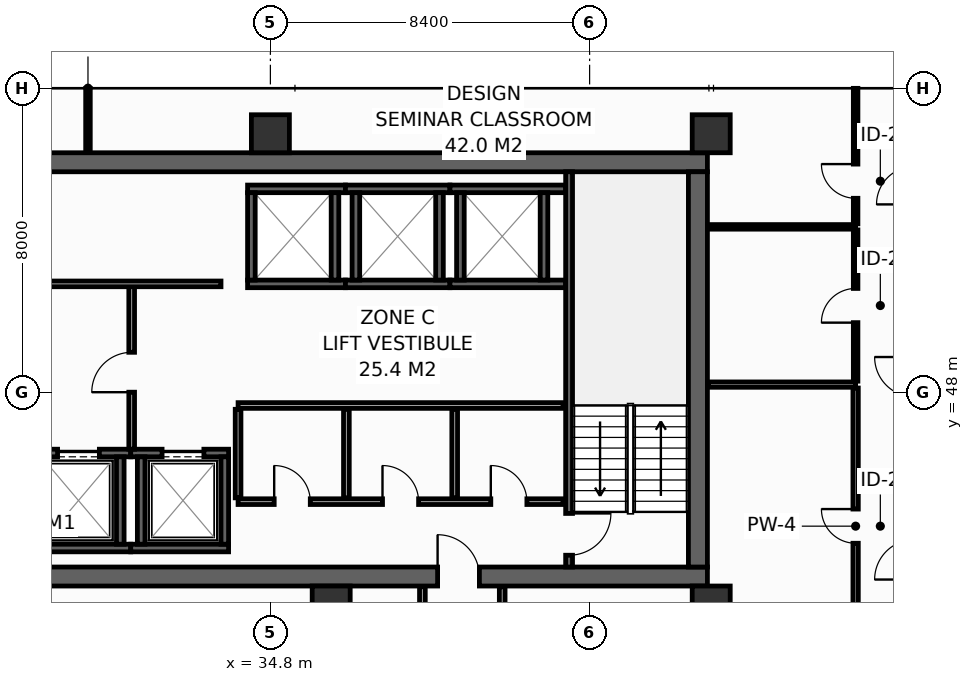
"""IFC4 building model, lengths in metres.
Left out: names, types, materials, properties, quantities, classifications, styles, units other than length and angle.
Written with IfcOpenShell. Run it as: python <this file> out.ifc"""

import sys

from ifc_helpers import new_model, si_unit, direction, frame, frame_2d, origin, origin_2d, place, context, subcontext, project, spatial, rectangle, hollow_rectangle, extrude, element, fill, save


model = new_model("IFC4")
c1 = context("Model", 3, precision=1e-05, world=origin(), true_north=direction((0.0, 1.0)))
c2 = subcontext(c1, "Body", "Model", "MODEL_VIEW")
j1 = project(units=[si_unit("LENGTHUNIT", "METRE"), si_unit("PLANEANGLEUNIT", "RADIAN")], contexts=[c1])
p1 = place(None, origin())
s1 = spatial("IfcSite", under=j1, at=p1, CompositionType="ELEMENT")
p2 = place(p1, origin())
s2 = spatial("IfcBuilding", under=s1, at=p2, CompositionType="ELEMENT")
p3 = place(p2, frame((0.0, 0.0, 171.4)))
s3 = spatial("IfcBuildingStorey", under=s2, at=p3, CompositionType="ELEMENT", Elevation=171.4)
p4 = place(p3, frame((13.6, 43.15, 0.0), z_axis=(0.0, 0.0, 1.0), x_axis=(1.0, 0.0, 0.0)))
e1 = element("IfcWall", 1, at=p4, inside=s3, PredefinedType="SHEAR", context=c2, shape_type="SweptSolid", body=[
    extrude(rectangle(XDim=32.7, YDim=0.5, at=frame_2d((16.35, 0.0))), origin(), (0.0, 0.0, 1.0), 3.55),
])
p5 = place(p4, frame((5.4, 0.0, 0.0)))
e2 = element("IfcOpeningElement", 2, at=p5, cuts=e1, PredefinedType="OPENING", context=c2, shape_type="SweptSolid", body=[
    extrude(rectangle(XDim=1.1, YDim=2.15, at=frame_2d((0.55, 1.075))), frame((0.0, 0.26, 0.0), z_axis=(0.0, -1.0, 0.0), x_axis=(1.0, 0.0, 0.0)), (0.0, 0.0, 1.0), 0.52),
])
p6 = place(p4, frame((25.6, 0.0, 0.0)))
e3 = element("IfcOpeningElement", 3, at=p6, cuts=e1, PredefinedType="OPENING", context=c2, shape_type="SweptSolid", body=[
    extrude(rectangle(XDim=1.1, YDim=2.15, at=frame_2d((0.55, 1.075))), frame((0.0, 0.26, 0.0), z_axis=(0.0, -1.0, 0.0), x_axis=(1.0, 0.0, 0.0)), (0.0, 0.0, 1.0), 0.52),
])
p7 = place(p3, frame((13.6, 54.05, 0.0), z_axis=(0.0, 0.0, 1.0), x_axis=(1.0, 0.0, 0.0)))
e4 = element("IfcWall", 4, at=p7, inside=s3, PredefinedType="SHEAR", context=c2, shape_type="SweptSolid", body=[
    extrude(rectangle(XDim=32.7, YDim=0.5, at=frame_2d((16.35, 0.0))), origin(), (0.0, 0.0, 1.0), 3.55),
])
p8 = place(p3, frame((46.05, 43.4, 0.0), z_axis=(0.0, 0.0, 1.0), x_axis=(0.0, 1.0, 0.0)))
e5 = element("IfcWall", 5, at=p8, inside=s3, PredefinedType="SHEAR", context=c2, shape_type="SweptSolid", body=[
    extrude(rectangle(XDim=10.4, YDim=0.5, at=frame_2d((5.2, 0.0))), origin(), (0.0, 0.0, 1.0), 3.55),
])
for number, where, z_axis, x_axis in (
    (6, (34.8, 54.8, 0.0), (0.0, 0.0, 1.0), (1.0, 0.0, 0.0)),
    (7, (46.4, 54.8, 0.0), (0.0, 0.0, 1.0), (1.0, 0.0, 0.0)),
    (8, (36.4, 42.4, 0.0), (0.0, 0.0, 1.0), (1.0, 0.0, 0.0)),
    (9, (46.4, 42.4, 0.0), (0.0, 0.0, 1.0), (1.0, 0.0, 0.0)),
):
    element("IfcColumn", number, at=place(p3, frame(where, z_axis=z_axis, x_axis=x_axis)), inside=s3, PredefinedType="COLUMN", context=c2, shape_type="SweptSolid", body=[
        extrude(hollow_rectangle(XDim=1.0, YDim=1.0, WallThickness=0.045, at=origin_2d()), origin(), (0.0, 0.0, 1.0), 3.8),
    ])
p9 = place(p3, frame((28.375, 43.9, 0.0), z_axis=(0.0, 0.0, 1.0), x_axis=(1.0, 0.0, 0.0)))
e10 = element("IfcWall", 10, at=p9, inside=s3, PredefinedType="SHEAR", context=c2, shape_type="SweptSolid", body=[
    extrude(rectangle(XDim=2.75, YDim=0.2, at=frame_2d((1.375, 0.0))), origin(), (0.0, 0.0, 1.0), 3.55),
])
p10 = place(p3, frame((28.375, 46.4, 0.0), z_axis=(0.0, 0.0, 1.0), x_axis=(1.0, 0.0, 0.0)))
e11 = element("IfcWall", 11, at=p10, inside=s3, PredefinedType="SHEAR", context=c2, shape_type="SweptSolid", body=[
    extrude(rectangle(XDim=2.75, YDim=0.2, at=frame_2d((1.375, 0.0))), origin(), (0.0, 0.0, 1.0), 3.55),
])
p11 = place(p10, frame((0.825, 0.0, 0.0)))
e12 = element("IfcOpeningElement", 12, at=p11, cuts=e11, PredefinedType="OPENING", context=c2, shape_type="SweptSolid", body=[
    extrude(rectangle(XDim=1.1, YDim=2.2, at=frame_2d((0.55, 1.1))), frame((0.0, 0.11, 0.0), z_axis=(0.0, -1.0, 0.0), x_axis=(1.0, 0.0, 0.0)), (0.0, 0.0, 1.0), 0.22),
])
p12 = place(p3, frame((30.85, 44.0, 0.0), z_axis=(0.0, 0.0, 1.0), x_axis=(0.0, 1.0, 0.0)))
e13 = element("IfcWall", 13, at=p12, inside=s3, PredefinedType="SHEAR", context=c2, shape_type="SweptSolid", body=[
    extrude(rectangle(XDim=2.3, YDim=0.2, at=frame_2d((1.15, 0.0))), origin(), (0.0, 0.0, 1.0), 3.55),
])
p13 = place(p3, frame((31.125, 43.9, 0.0), z_axis=(0.0, 0.0, 1.0), x_axis=(1.0, 0.0, 0.0)))
e14 = element("IfcWall", 14, at=p13, inside=s3, PredefinedType="SHEAR", context=c2, shape_type="SweptSolid", body=[
    extrude(rectangle(XDim=2.575, YDim=0.2, at=frame_2d((1.288, 0.0))), origin(), (0.0, 0.0, 1.0), 3.55),
])
p14 = place(p3, frame((31.125, 46.4, 0.0), z_axis=(0.0, 0.0, 1.0), x_axis=(1.0, 0.0, 0.0)))
e15 = element("IfcWall", 15, at=p14, inside=s3, PredefinedType="SHEAR", context=c2, shape_type="SweptSolid", body=[
    extrude(rectangle(XDim=2.575, YDim=0.2, at=frame_2d((1.288, 0.0))), origin(), (0.0, 0.0, 1.0), 3.55),
])
p15 = place(p14, frame((0.825, 0.0, 0.0)))
e16 = element("IfcOpeningElement", 16, at=p15, cuts=e15, PredefinedType="OPENING", context=c2, shape_type="SweptSolid", body=[
    extrude(rectangle(XDim=1.1, YDim=2.2, at=frame_2d((0.55, 1.1))), frame((0.0, 0.11, 0.0), z_axis=(0.0, -1.0, 0.0), x_axis=(1.0, 0.0, 0.0)), (0.0, 0.0, 1.0), 0.22),
])
for number, where, z_axis, x_axis in (
    (17, (31.4, 44.0, 0.0), (0.0, 0.0, 1.0), (0.0, 1.0, 0.0)),
    (18, (33.6, 44.0, 0.0), (0.0, 0.0, 1.0), (0.0, 1.0, 0.0)),
):
    element("IfcWall", number, at=place(p3, frame(where, z_axis=z_axis, x_axis=x_axis)), inside=s3, PredefinedType="SHEAR", context=c2, shape_type="SweptSolid", body=[
        extrude(rectangle(XDim=2.3, YDim=0.2, at=frame_2d((1.15, 0.0))), origin(), (0.0, 0.0, 1.0), 3.55),
    ])
for number, where, z_axis, x_axis in (
    (19, (34.2, 50.85, 0.0), (0.0, 0.0, 1.0), (1.0, 0.0, 0.0)),
    (20, (34.2, 53.35, 0.0), (0.0, 0.0, 1.0), (1.0, 0.0, 0.0)),
):
    element("IfcWall", number, at=place(p3, frame(where, z_axis=z_axis, x_axis=x_axis)), inside=s3, PredefinedType="SHEAR", context=c2, shape_type="SweptSolid", body=[
        extrude(rectangle(XDim=2.575, YDim=0.2, at=frame_2d((1.288, 0.0))), origin(), (0.0, 0.0, 1.0), 3.55),
    ])
for number, where, z_axis, x_axis in (
    (21, (34.3, 50.95, 0.0), (0.0, 0.0, 1.0), (0.0, 1.0, 0.0)),
    (22, (36.5, 50.95, 0.0), (0.0, 0.0, 1.0), (0.0, 1.0, 0.0)),
):
    element("IfcWall", number, at=place(p3, frame(where, z_axis=z_axis, x_axis=x_axis)), inside=s3, PredefinedType="SHEAR", context=c2, shape_type="SweptSolid", body=[
        extrude(rectangle(XDim=2.3, YDim=0.2, at=frame_2d((1.15, 0.0))), origin(), (0.0, 0.0, 1.0), 3.55),
    ])
for number, where, z_axis, x_axis in (
    (23, (36.775, 50.85, 0.0), (0.0, 0.0, 1.0), (1.0, 0.0, 0.0)),
    (24, (36.775, 53.35, 0.0), (0.0, 0.0, 1.0), (1.0, 0.0, 0.0)),
):
    element("IfcWall", number, at=place(p3, frame(where, z_axis=z_axis, x_axis=x_axis)), inside=s3, PredefinedType="SHEAR", context=c2, shape_type="SweptSolid", body=[
        extrude(rectangle(XDim=2.75, YDim=0.2, at=frame_2d((1.375, 0.0))), origin(), (0.0, 0.0, 1.0), 3.55),
    ])
for number, where, z_axis, x_axis in (
    (25, (37.05, 50.95, 0.0), (0.0, 0.0, 1.0), (0.0, 1.0, 0.0)),
    (26, (39.25, 50.95, 0.0), (0.0, 0.0, 1.0), (0.0, 1.0, 0.0)),
):
    element("IfcWall", number, at=place(p3, frame(where, z_axis=z_axis, x_axis=x_axis)), inside=s3, PredefinedType="SHEAR", context=c2, shape_type="SweptSolid", body=[
        extrude(rectangle(XDim=2.3, YDim=0.2, at=frame_2d((1.15, 0.0))), origin(), (0.0, 0.0, 1.0), 3.55),
    ])
for number, where, z_axis, x_axis in (
    (27, (39.525, 50.85, 0.0), (0.0, 0.0, 1.0), (1.0, 0.0, 0.0)),
    (28, (39.525, 53.35, 0.0), (0.0, 0.0, 1.0), (1.0, 0.0, 0.0)),
):
    element("IfcWall", number, at=place(p3, frame(where, z_axis=z_axis, x_axis=x_axis)), inside=s3, PredefinedType="SHEAR", context=c2, shape_type="SweptSolid", body=[
        extrude(rectangle(XDim=3.045, YDim=0.2, at=frame_2d((1.522, 0.0))), origin(), (0.0, 0.0, 1.0), 3.55),
    ])
for number, where, z_axis, x_axis in (
    (29, (39.8, 50.95, 0.0), (0.0, 0.0, 1.0), (0.0, 1.0, 0.0)),
    (30, (42.0, 50.95, 0.0), (0.0, 0.0, 1.0), (0.0, 1.0, 0.0)),
):
    element("IfcWall", number, at=place(p3, frame(where, z_axis=z_axis, x_axis=x_axis)), inside=s3, PredefinedType="SHEAR", context=c2, shape_type="SweptSolid", body=[
        extrude(rectangle(XDim=2.3, YDim=0.2, at=frame_2d((1.15, 0.0))), origin(), (0.0, 0.0, 1.0), 3.55),
    ])
p16 = place(p3, frame((42.66, 53.8, 0.0), z_axis=(0.0, 0.0, 1.0), x_axis=(0.0, -1.0, 0.0)))
e31 = element("IfcWall", 31, at=p16, inside=s3, PredefinedType="SHEAR", context=c2, shape_type="SweptSolid", body=[
    extrude(rectangle(XDim=10.4, YDim=0.18, at=frame_2d((5.2, 0.0))), origin(), (0.0, 0.0, 1.0), 3.55),
])
p17 = place(p16, frame((8.99, 0.0, 0.0)))
e32 = element("IfcOpeningElement", 32, at=p17, cuts=e31, PredefinedType="OPENING", context=c2, shape_type="SweptSolid", body=[
    extrude(rectangle(XDim=1.1, YDim=2.15, at=frame_2d((0.55, 1.075))), frame((0.0, 0.1, 0.0), z_axis=(0.0, -1.0, 0.0), x_axis=(1.0, 0.0, 0.0)), (0.0, 0.0, 1.0), 0.2),
])
p18 = place(p3, frame((31.15, 46.5, 0.0), z_axis=(0.0, 0.0, 1.0), x_axis=(0.0, 1.0, 0.0)))
e33 = element("IfcWall", 33, at=p18, inside=s3, PredefinedType="PARTITIONING", context=c2, shape_type="SweptSolid", body=[
    extrude(rectangle(XDim=4.35, YDim=0.15, at=frame_2d((2.175, 0.0))), origin(), (0.0, 0.0, 1.0), 3.55),
])
p19 = place(p18, frame((1.5, 0.0, 0.0)))
e34 = element("IfcOpeningElement", 34, at=p19, cuts=e33, PredefinedType="OPENING", context=c2, shape_type="SweptSolid", body=[
    extrude(rectangle(XDim=1.05, YDim=2.15, at=frame_2d((0.525, 1.075))), frame((0.0, 0.085, 0.0), z_axis=(0.0, -1.0, 0.0), x_axis=(1.0, 0.0, 0.0)), (0.0, 0.0, 1.0), 0.17),
])
p20 = place(p3, frame((33.95, 45.12, 0.0), z_axis=(0.0, 0.0, 1.0), x_axis=(1.0, 0.0, 0.0)))
e35 = element("IfcWall", 35, at=p20, inside=s3, PredefinedType="PARTITIONING", context=c2, shape_type="SweptSolid", body=[
    extrude(rectangle(XDim=8.55, YDim=0.15, at=frame_2d((4.275, 0.0))), origin(), (0.0, 0.0, 1.0), 3.55),
])
p21 = place(p20, frame((0.95, 0.0, 0.0)))
e36 = element("IfcOpeningElement", 36, at=p21, cuts=e35, PredefinedType="OPENING", context=c2, shape_type="SweptSolid", body=[
    extrude(rectangle(XDim=0.95, YDim=2.15, at=frame_2d((0.475, 1.075))), frame((0.0, 0.085, 0.0), z_axis=(0.0, -1.0, 0.0), x_axis=(1.0, 0.0, 0.0)), (0.0, 0.0, 1.0), 0.17),
])
p22 = place(p20, frame((3.8, 0.0, 0.0)))
e37 = element("IfcOpeningElement", 37, at=p22, cuts=e35, PredefinedType="OPENING", context=c2, shape_type="SweptSolid", body=[
    extrude(rectangle(XDim=0.95, YDim=2.15, at=frame_2d((0.475, 1.075))), frame((0.0, 0.085, 0.0), z_axis=(0.0, -1.0, 0.0), x_axis=(1.0, 0.0, 0.0)), (0.0, 0.0, 1.0), 0.17),
])
p23 = place(p20, frame((6.65, 0.0, 0.0)))
e38 = element("IfcOpeningElement", 38, at=p23, cuts=e35, PredefinedType="OPENING", context=c2, shape_type="SweptSolid", body=[
    extrude(rectangle(XDim=0.95, YDim=2.15, at=frame_2d((0.475, 1.075))), frame((0.0, 0.085, 0.0), z_axis=(0.0, -1.0, 0.0), x_axis=(1.0, 0.0, 0.0)), (0.0, 0.0, 1.0), 0.17),
])
p24 = place(p3, frame((33.95, 47.65, 0.0), z_axis=(0.0, 0.0, 1.0), x_axis=(1.0, 0.0, 0.0)))
e39 = element("IfcWall", 39, at=p24, inside=s3, PredefinedType="PARTITIONING", context=c2, shape_type="SweptSolid", body=[
    extrude(rectangle(XDim=8.55, YDim=0.15, at=frame_2d((4.275, 0.0))), origin(), (0.0, 0.0, 1.0), 3.55),
])
for number, where, z_axis, x_axis in (
    (40, (33.95, 45.22, 0.0), (0.0, 0.0, 1.0), (0.0, 1.0, 0.0)),
    (41, (36.8, 45.22, 0.0), (0.0, 0.0, 1.0), (0.0, 1.0, 0.0)),
    (42, (39.65, 45.22, 0.0), (0.0, 0.0, 1.0), (0.0, 1.0, 0.0)),
):
    element("IfcWall", number, at=place(p3, frame(where, z_axis=z_axis, x_axis=x_axis)), inside=s3, PredefinedType="PARTITIONING", context=c2, shape_type="SweptSolid", body=[
        extrude(rectangle(XDim=2.33, YDim=0.15, at=frame_2d((1.165, 0.0))), origin(), (0.0, 0.0, 1.0), 3.55),
    ])
p25 = place(p3, frame((25.85, 50.85, 0.0), z_axis=(0.0, 0.0, 1.0), x_axis=(1.0, 0.0, 0.0)))
e43 = element("IfcWall", 43, at=p25, inside=s3, PredefinedType="PARTITIONING", context=c2, shape_type="SweptSolid", body=[
    extrude(rectangle(XDim=7.65, YDim=0.15, at=frame_2d((3.825, 0.0))), origin(), (0.0, 0.0, 1.0), 3.55),
])
p26 = place(p25, frame((1.25, 0.0, 0.0)))
e44 = element("IfcOpeningElement", 44, at=p26, cuts=e43, PredefinedType="OPENING", context=c2, shape_type="SweptSolid", body=[
    extrude(rectangle(XDim=0.95, YDim=2.15, at=frame_2d((0.475, 1.075))), frame((0.0, 0.085, 0.0), z_axis=(0.0, -1.0, 0.0), x_axis=(1.0, 0.0, 0.0)), (0.0, 0.0, 1.0), 0.17),
])
p27 = place(p3, frame((46.15, 40.84, 0.0), z_axis=(0.0, 0.0, 1.0), x_axis=(0.0, 1.0, 0.0)))
e45 = element("IfcWall", 45, at=p27, inside=s3, PredefinedType="PARTITIONING", context=c2, shape_type="SweptSolid", body=[
    extrude(rectangle(XDim=2.04, YDim=0.14, at=frame_2d((1.02, 0.0))), origin(), (0.0, 0.0, 1.0), 3.55),
])
p28 = place(p3, frame((46.32, 48.2, 0.0), z_axis=(0.0, 0.0, 1.0), x_axis=(1.0, 0.0, 0.0)))
e46 = element("IfcWall", 46, at=p28, inside=s3, PredefinedType="PARTITIONING", context=c2, shape_type="SweptSolid", body=[
    extrude(rectangle(XDim=3.88, YDim=0.14, at=frame_2d((1.94, 0.0))), origin(), (0.0, 0.0, 1.0), 3.55),
])
p29 = place(p3, frame((50.2, 40.84, 0.0), z_axis=(0.0, 0.0, 1.0), x_axis=(0.0, 1.0, 0.0)))
e47 = element("IfcWall", 47, at=p29, inside=s3, PredefinedType="PARTITIONING", context=c2, shape_type="SweptSolid", body=[
    extrude(rectangle(XDim=7.27, YDim=0.14, at=frame_2d((3.635, 0.0))), origin(), (0.0, 0.0, 1.0), 2.835),
])
p30 = place(p29, frame((3.185, 0.0, 0.0)))
e48 = element("IfcOpeningElement", 48, at=p30, cuts=e47, PredefinedType="OPENING", context=c2, shape_type="SweptSolid", body=[
    extrude(rectangle(XDim=0.9, YDim=2.1, at=frame_2d((0.45, 1.05))), frame((0.0, 0.08, 0.0), z_axis=(0.0, -1.0, 0.0), x_axis=(1.0, 0.0, 0.0)), (0.0, 0.0, 1.0), 0.16),
])
p31 = place(p3, frame((46.32, 52.35, 0.0), z_axis=(0.0, 0.0, 1.0), x_axis=(1.0, 0.0, 0.0)))
e49 = element("IfcWall", 49, at=p31, inside=s3, PredefinedType="PARTITIONING", context=c2, shape_type="SweptSolid", body=[
    extrude(rectangle(XDim=3.88, YDim=0.12, at=frame_2d((1.94, 0.0))), origin(), (0.0, 0.0, 1.0), 3.55),
])
p32 = place(p3, frame((30.0, 54.32, 0.0), z_axis=(0.0, 0.0, 1.0), x_axis=(0.0, 1.0, 0.0)))
e50 = element("IfcWall", 50, at=p32, inside=s3, PredefinedType="PARTITIONING", context=c2, shape_type="SweptSolid", body=[
    extrude(rectangle(XDim=1.675, YDim=0.12, at=frame_2d((0.837, 0.0))), origin(), (0.0, 0.0, 1.0), 2.935),
])
p33 = place(p3, frame((50.2, 48.29, 0.0), z_axis=(0.0, 0.0, 1.0), x_axis=(0.0, 1.0, 0.0)))
e51 = element("IfcWall", 51, at=p33, inside=s3, PredefinedType="PARTITIONING", context=c2, shape_type="SweptSolid", body=[
    extrude(rectangle(XDim=3.98, YDim=0.12, at=frame_2d((1.99, 0.0))), origin(), (0.0, 0.0, 1.0), 3.55),
])
p34 = place(p33, frame((1.54, 0.0, 0.0)))
e52 = element("IfcOpeningElement", 52, at=p34, cuts=e51, PredefinedType="OPENING", context=c2, shape_type="SweptSolid", body=[
    extrude(rectangle(XDim=0.9, YDim=2.1, at=frame_2d((0.45, 1.05))), frame((0.0, 0.07, 0.0), z_axis=(0.0, -1.0, 0.0), x_axis=(1.0, 0.0, 0.0)), (0.0, 0.0, 1.0), 0.14),
])
p35 = place(p3, frame((50.2, 52.43, 0.0), z_axis=(0.0, 0.0, 1.0), x_axis=(0.0, 1.0, 0.0)))
e53 = element("IfcWall", 53, at=p35, inside=s3, PredefinedType="PARTITIONING", context=c2, shape_type="SweptSolid", body=[
    extrude(rectangle(XDim=3.565, YDim=0.12, at=frame_2d((1.783, 0.0))), origin(), (0.0, 0.0, 1.0), 2.935),
])
p36 = place(p35, frame((0.672, 0.0, 0.0)))
e54 = element("IfcOpeningElement", 54, at=p36, cuts=e53, PredefinedType="OPENING", context=c2, shape_type="SweptSolid", body=[
    extrude(rectangle(XDim=0.9, YDim=2.1, at=frame_2d((0.45, 1.05))), frame((0.0, 0.07, 0.0), z_axis=(0.0, -1.0, 0.0), x_axis=(1.0, 0.0, 0.0)), (0.0, 0.0, 1.0), 0.14),
])
for number, where, z_axis, x_axis in (
    (55, (38.8, 40.75, 0.0), (0.0, 0.0, 1.0), (0.0, 1.0, 0.0)),
    (56, (40.9, 40.75, 0.0), (0.0, 0.0, 1.0), (0.0, 1.0, 0.0)),
):
    element("IfcWall", number, at=place(p3, frame(where, z_axis=z_axis, x_axis=x_axis)), inside=s3, PredefinedType="PARTITIONING", context=c2, shape_type="SweptSolid", body=[
        extrude(rectangle(XDim=2.13, YDim=0.15, at=frame_2d((1.065, 0.0))), origin(), (0.0, 0.0, 1.0), 3.55),
    ])
p37 = place(p11, origin())
e57 = element("IfcDoor", 57, at=p37, inside=s3, OperationType="SLIDING_TO_LEFT", PredefinedType="DOOR", context=c2, shape_type="SweptSolid", body=[
    extrude(rectangle(XDim=1.1, YDim=2.2, at=frame_2d((0.55, 1.1))), frame((0.0, 0.025, 0.0), z_axis=(0.0, -1.0, 0.0), x_axis=(1.0, 0.0, 0.0)), (0.0, 0.0, 1.0), 0.05),
])
fill(e12, e57)
p38 = place(p15, origin())
e58 = element("IfcDoor", 58, at=p38, inside=s3, OperationType="SLIDING_TO_LEFT", PredefinedType="DOOR", context=c2, shape_type="SweptSolid", body=[
    extrude(rectangle(XDim=1.1, YDim=2.2, at=frame_2d((0.55, 1.1))), frame((0.0, 0.025, 0.0), z_axis=(0.0, -1.0, 0.0), x_axis=(1.0, 0.0, 0.0)), (0.0, 0.0, 1.0), 0.05),
])
fill(e16, e58)
p39 = place(p17, origin())
e59 = element("IfcDoor", 59, at=p39, inside=s3, OperationType="SINGLE_SWING_LEFT", PredefinedType="DOOR", context=c2, shape_type="SweptSolid", body=[
    extrude(rectangle(XDim=1.1, YDim=2.15, at=frame_2d((0.55, 1.075))), frame((0.0, 0.025, 0.0), z_axis=(0.0, -1.0, 0.0), x_axis=(1.0, 0.0, 0.0)), (0.0, 0.0, 1.0), 0.05),
])
fill(e32, e59)
p40 = place(p6, origin())
e60 = element("IfcDoor", 60, at=p40, inside=s3, OperationType="SINGLE_SWING_LEFT", PredefinedType="DOOR", context=c2, shape_type="SweptSolid", body=[
    extrude(rectangle(XDim=1.1, YDim=2.15, at=frame_2d((0.55, 1.075))), frame((0.0, 0.025, 0.0), z_axis=(0.0, -1.0, 0.0), x_axis=(1.0, 0.0, 0.0)), (0.0, 0.0, 1.0), 0.05),
])
fill(e3, e60)
p41 = place(p19, origin())
e61 = element("IfcDoor", 61, at=p41, inside=s3, OperationType="SINGLE_SWING_LEFT", PredefinedType="DOOR", context=c2, shape_type="SweptSolid", body=[
    extrude(rectangle(XDim=1.05, YDim=2.15, at=frame_2d((0.525, 1.075))), frame((0.0, 0.025, 0.0), z_axis=(0.0, -1.0, 0.0), x_axis=(1.0, 0.0, 0.0)), (0.0, 0.0, 1.0), 0.05),
])
fill(e34, e61)
p42 = place(p21, origin())
e62 = element("IfcDoor", 62, at=p42, inside=s3, OperationType="SINGLE_SWING_LEFT", PredefinedType="DOOR", context=c2, shape_type="SweptSolid", body=[
    extrude(rectangle(XDim=0.95, YDim=2.15, at=frame_2d((0.475, 1.075))), frame((0.0, 0.025, 0.0), z_axis=(0.0, -1.0, 0.0), x_axis=(1.0, 0.0, 0.0)), (0.0, 0.0, 1.0), 0.05),
])
fill(e36, e62)
p43 = place(p22, origin())
e63 = element("IfcDoor", 63, at=p43, inside=s3, OperationType="SINGLE_SWING_LEFT", PredefinedType="DOOR", context=c2, shape_type="SweptSolid", body=[
    extrude(rectangle(XDim=0.95, YDim=2.15, at=frame_2d((0.475, 1.075))), frame((0.0, 0.025, 0.0), z_axis=(0.0, -1.0, 0.0), x_axis=(1.0, 0.0, 0.0)), (0.0, 0.0, 1.0), 0.05),
])
fill(e37, e63)
p44 = place(p23, origin())
e64 = element("IfcDoor", 64, at=p44, inside=s3, OperationType="SINGLE_SWING_LEFT", PredefinedType="DOOR", context=c2, shape_type="SweptSolid", body=[
    extrude(rectangle(XDim=0.95, YDim=2.15, at=frame_2d((0.475, 1.075))), frame((0.0, 0.025, 0.0), z_axis=(0.0, -1.0, 0.0), x_axis=(1.0, 0.0, 0.0)), (0.0, 0.0, 1.0), 0.05),
])
fill(e38, e64)
p45 = place(p30, origin())
e65 = element("IfcDoor", 65, at=p45, inside=s3, OperationType="SINGLE_SWING_RIGHT", PredefinedType="DOOR", context=c2, shape_type="SweptSolid", body=[
    extrude(rectangle(XDim=0.9, YDim=2.1, at=frame_2d((0.45, 1.05))), frame((0.0, 0.025, 0.0), z_axis=(0.0, -1.0, 0.0), x_axis=(1.0, 0.0, 0.0)), (0.0, 0.0, 1.0), 0.05),
])
fill(e48, e65)
p46 = place(p34, origin())
e66 = element("IfcDoor", 66, at=p46, inside=s3, OperationType="SINGLE_SWING_LEFT", PredefinedType="DOOR", context=c2, shape_type="SweptSolid", body=[
    extrude(rectangle(XDim=0.9, YDim=2.1, at=frame_2d((0.45, 1.05))), frame((0.0, 0.025, 0.0), z_axis=(0.0, -1.0, 0.0), x_axis=(1.0, 0.0, 0.0)), (0.0, 0.0, 1.0), 0.05),
])
fill(e52, e66)
p47 = place(p36, origin())
e67 = element("IfcDoor", 67, at=p47, inside=s3, OperationType="SINGLE_SWING_RIGHT", PredefinedType="DOOR", context=c2, shape_type="SweptSolid", body=[
    extrude(rectangle(XDim=0.9, YDim=2.1, at=frame_2d((0.45, 1.05))), frame((0.0, 0.025, 0.0), z_axis=(0.0, -1.0, 0.0), x_axis=(1.0, 0.0, 0.0)), (0.0, 0.0, 1.0), 0.05),
])
fill(e54, e67)
save(model, sys.argv[1])
